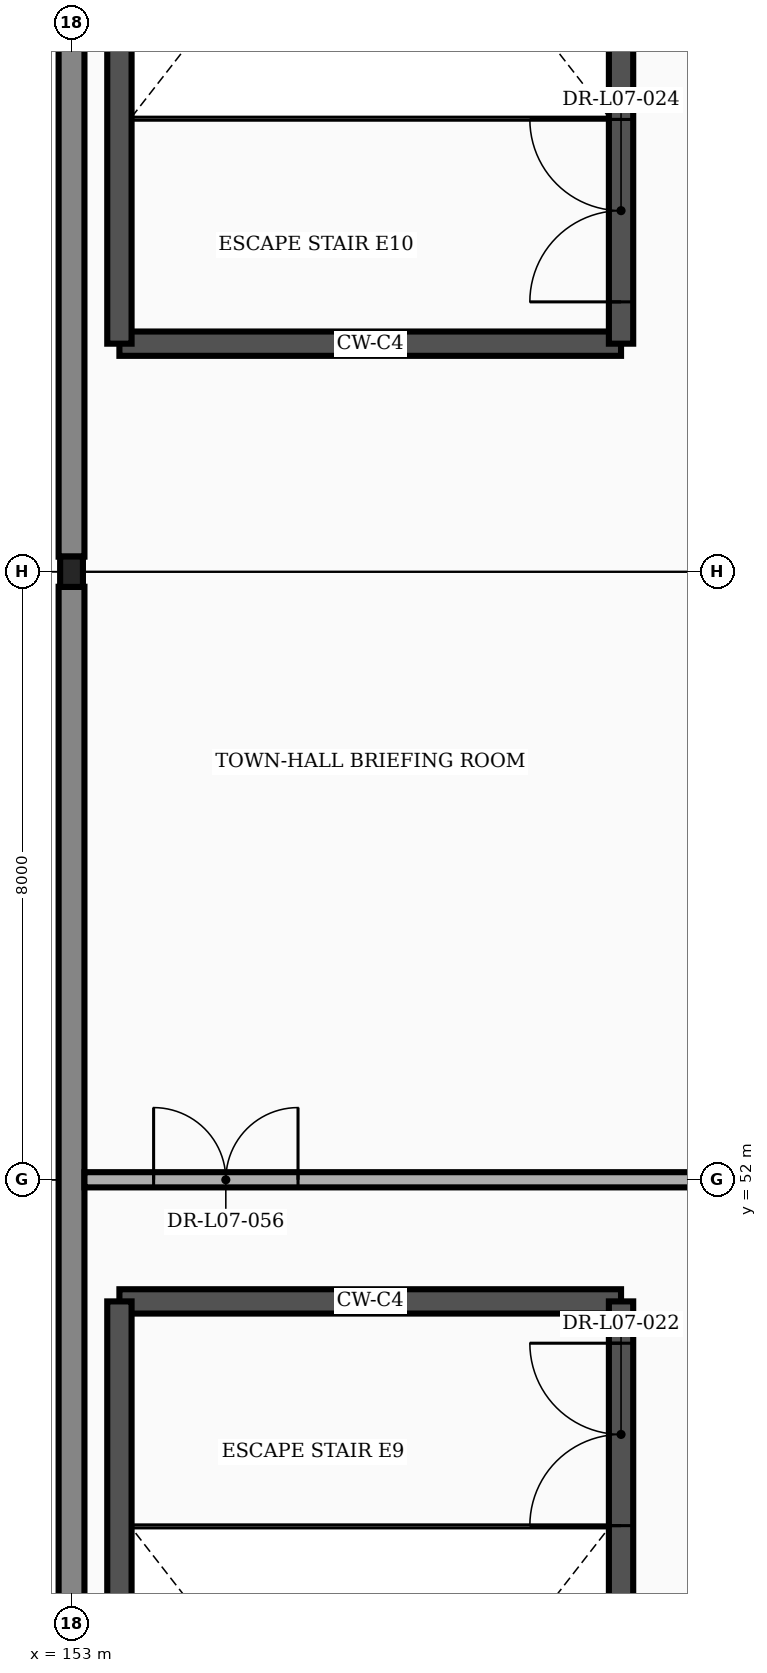
"""IFC4 building model, lengths in metres.
Left out: names, types, materials, properties, quantities, classifications, styles, units other than length and angle.
Written with IfcOpenShell. Run it as: python <this file> out.ifc"""

import sys

from ifc_helpers import new_model, si_unit, direction, frame, frame_2d, origin, origin_2d, place, context, subcontext, project, spatial, rectangle, i_section, extrude, element, fill, save


model = new_model("IFC4")
c1 = context("Model", 3, precision=1e-05, world=origin(), true_north=direction((0.0, 1.0)))
c2 = subcontext(c1, "Body", "Model", "MODEL_VIEW")
j1 = project(units=[si_unit("LENGTHUNIT", "METRE"), si_unit("PLANEANGLEUNIT", "RADIAN")], contexts=[c1])
p1 = place(None, origin())
s1 = spatial("IfcSite", under=j1, at=p1, CompositionType="ELEMENT")
p2 = place(p1, origin())
s2 = spatial("IfcBuilding", under=s1, at=p2, CompositionType="ELEMENT")
p3 = place(p2, frame((0.0, 0.0, 33.3)))
s3 = spatial("IfcBuildingStorey", under=s2, at=p3, CompositionType="ELEMENT", Elevation=33.3)
p4 = place(p3, frame((153.0, 60.0, 0.0), z_axis=(0.0, 0.0, 1.0), x_axis=(1.0, 0.0, 0.0)))
e1 = element("IfcColumn", 1, at=p4, inside=s3, PredefinedType="COLUMN", context=c2, shape_type="SweptSolid", body=[
    extrude(i_section(OverallWidth=0.3, OverallDepth=0.4, WebThickness=0.013, FlangeThickness=0.024, FilletRadius=0.027, at=origin_2d()), origin(), (0.0, 0.0, 1.0), 4.5),
])
for number, where, z_axis, x_axis in (
    (2, (153.0, 36.198, 0.0), (0.0, 0.0, 1.0), (0.0, 1.0, 0.0)),
    (3, (153.0, 60.198, 0.0), (0.0, 0.0, 1.0), (0.0, 1.0, 0.0)),
):
    element("IfcWall", number, at=place(p3, frame(where, z_axis=z_axis, x_axis=x_axis)), inside=s3, PredefinedType="STANDARD", context=c2, shape_type="SweptSolid", body=[
        extrude(rectangle(XDim=23.604, YDim=0.34, at=frame_2d((11.802, 0.0))), origin(), (0.0, 0.0, 1.0), 3.563),
    ])
p5 = place(p3, frame((153.63, 50.4, 0.0), z_axis=(0.0, 0.0, 1.0), x_axis=(1.0, 0.0, 0.0)))
e4 = element("IfcWall", 4, at=p5, inside=s3, PredefinedType="SHEAR", context=c2, shape_type="SweptSolid", body=[
    extrude(rectangle(XDim=6.6, YDim=0.32, at=frame_2d((3.3, 0.0))), origin(), (0.0, 0.0, 1.0), 4.255),
])
p6 = place(p3, frame((153.63, 39.2, 0.0), z_axis=(0.0, 0.0, 1.0), x_axis=(0.0, 1.0, 0.0)))
e5 = element("IfcWall", 5, at=p6, inside=s3, PredefinedType="SHEAR", context=c2, shape_type="SweptSolid", body=[
    extrude(rectangle(XDim=11.2, YDim=0.32, at=frame_2d((5.6, 0.0))), origin(), (0.0, 0.0, 1.0), 4.255),
])
p7 = place(p3, frame((160.23, 39.2, 0.0), z_axis=(0.0, 0.0, 1.0), x_axis=(0.0, 1.0, 0.0)))
e6 = element("IfcWall", 6, at=p7, inside=s3, PredefinedType="SHEAR", context=c2, shape_type="SweptSolid", body=[
    extrude(rectangle(XDim=11.2, YDim=0.32, at=frame_2d((5.6, 0.0))), origin(), (0.0, 0.0, 1.0), 4.255),
])
p8 = place(p7, frame((8.25, 0.0, 0.0)))
e7 = element("IfcOpeningElement", 7, at=p8, cuts=e6, PredefinedType="OPENING", context=c2, shape_type="SweptSolid", body=[
    extrude(rectangle(XDim=2.4, YDim=2.25, at=frame_2d((1.2, 1.125))), frame((0.0, 0.172, 0.0), z_axis=(0.0, -1.0, 0.0), x_axis=(1.0, 0.0, 0.0)), (0.0, 0.0, 1.0), 0.344),
])
p9 = place(p3, frame((153.63, 63.0, 0.0), z_axis=(0.0, 0.0, 1.0), x_axis=(1.0, 0.0, 0.0)))
e8 = element("IfcWall", 8, at=p9, inside=s3, PredefinedType="SHEAR", context=c2, shape_type="SweptSolid", body=[
    extrude(rectangle(XDim=6.6, YDim=0.32, at=frame_2d((3.3, 0.0))), origin(), (0.0, 0.0, 1.0), 4.255),
])
p10 = place(p3, frame((153.63, 63.0, 0.0), z_axis=(0.0, 0.0, 1.0), x_axis=(0.0, 1.0, 0.0)))
e9 = element("IfcWall", 9, at=p10, inside=s3, PredefinedType="SHEAR", context=c2, shape_type="SweptSolid", body=[
    extrude(rectangle(XDim=11.2, YDim=0.32, at=frame_2d((5.6, 0.0))), origin(), (0.0, 0.0, 1.0), 4.255),
])
p11 = place(p3, frame((160.23, 63.0, 0.0), z_axis=(0.0, 0.0, 1.0), x_axis=(0.0, 1.0, 0.0)))
e10 = element("IfcWall", 10, at=p11, inside=s3, PredefinedType="SHEAR", context=c2, shape_type="SweptSolid", body=[
    extrude(rectangle(XDim=11.2, YDim=0.32, at=frame_2d((5.6, 0.0))), origin(), (0.0, 0.0, 1.0), 4.255),
])
p12 = place(p11, frame((0.55, 0.0, 0.0)))
e11 = element("IfcOpeningElement", 11, at=p12, cuts=e10, PredefinedType="OPENING", context=c2, shape_type="SweptSolid", body=[
    extrude(rectangle(XDim=2.4, YDim=2.25, at=frame_2d((1.2, 1.125))), frame((0.0, 0.172, 0.0), z_axis=(0.0, -1.0, 0.0), x_axis=(1.0, 0.0, 0.0)), (0.0, 0.0, 1.0), 0.344),
])
p13 = place(p3, frame((153.17, 52.0, 0.0), z_axis=(0.0, 0.0, 1.0), x_axis=(1.0, 0.0, 0.0)))
e12 = element("IfcWall", 12, at=p13, inside=s3, PredefinedType="PARTITIONING", context=c2, shape_type="SweptSolid", body=[
    extrude(rectangle(XDim=18.27, YDim=0.2, at=frame_2d((9.135, 0.0))), origin(), (0.0, 0.0, 1.0), 3.868),
])
p14 = place(p13, frame((0.91, 0.0, 0.0)))
e13 = element("IfcOpeningElement", 13, at=p14, cuts=e12, PredefinedType="OPENING", context=c2, shape_type="SweptSolid", body=[
    extrude(rectangle(XDim=1.9, YDim=2.35, at=frame_2d((0.95, 1.175))), frame((0.0, 0.112, 0.0), z_axis=(0.0, -1.0, 0.0), x_axis=(1.0, 0.0, 0.0)), (0.0, 0.0, 1.0), 0.224),
])
p15 = place(p8, origin())
e14 = element("IfcDoor", 14, at=p15, inside=s3, OperationType="DOUBLE_DOOR_SINGLE_SWING", PredefinedType="DOOR", context=c2, shape_type="SweptSolid", body=[
    extrude(rectangle(XDim=2.4, YDim=2.25, at=frame_2d((1.2, 1.125))), frame((0.0, 0.025, 0.0), z_axis=(0.0, -1.0, 0.0), x_axis=(1.0, 0.0, 0.0)), (0.0, 0.0, 1.0), 0.05),
])
fill(e7, e14)
p16 = place(p12, origin())
e15 = element("IfcDoor", 15, at=p16, inside=s3, OperationType="DOUBLE_DOOR_SINGLE_SWING", PredefinedType="DOOR", context=c2, shape_type="SweptSolid", body=[
    extrude(rectangle(XDim=2.4, YDim=2.25, at=frame_2d((1.2, 1.125))), frame((0.0, 0.025, 0.0), z_axis=(0.0, -1.0, 0.0), x_axis=(1.0, 0.0, 0.0)), (0.0, 0.0, 1.0), 0.05),
])
fill(e11, e15)
p17 = place(p14, origin())
e16 = element("IfcDoor", 16, at=p17, inside=s3, OperationType="DOUBLE_DOOR_SINGLE_SWING", PredefinedType="DOOR", context=c2, shape_type="SweptSolid", body=[
    extrude(rectangle(XDim=1.9, YDim=2.35, at=frame_2d((0.95, 1.175))), frame((0.0, 0.025, 0.0), z_axis=(0.0, -1.0, 0.0), x_axis=(1.0, 0.0, 0.0)), (0.0, 0.0, 1.0), 0.05),
])
fill(e13, e16)
save(model, sys.argv[1])
